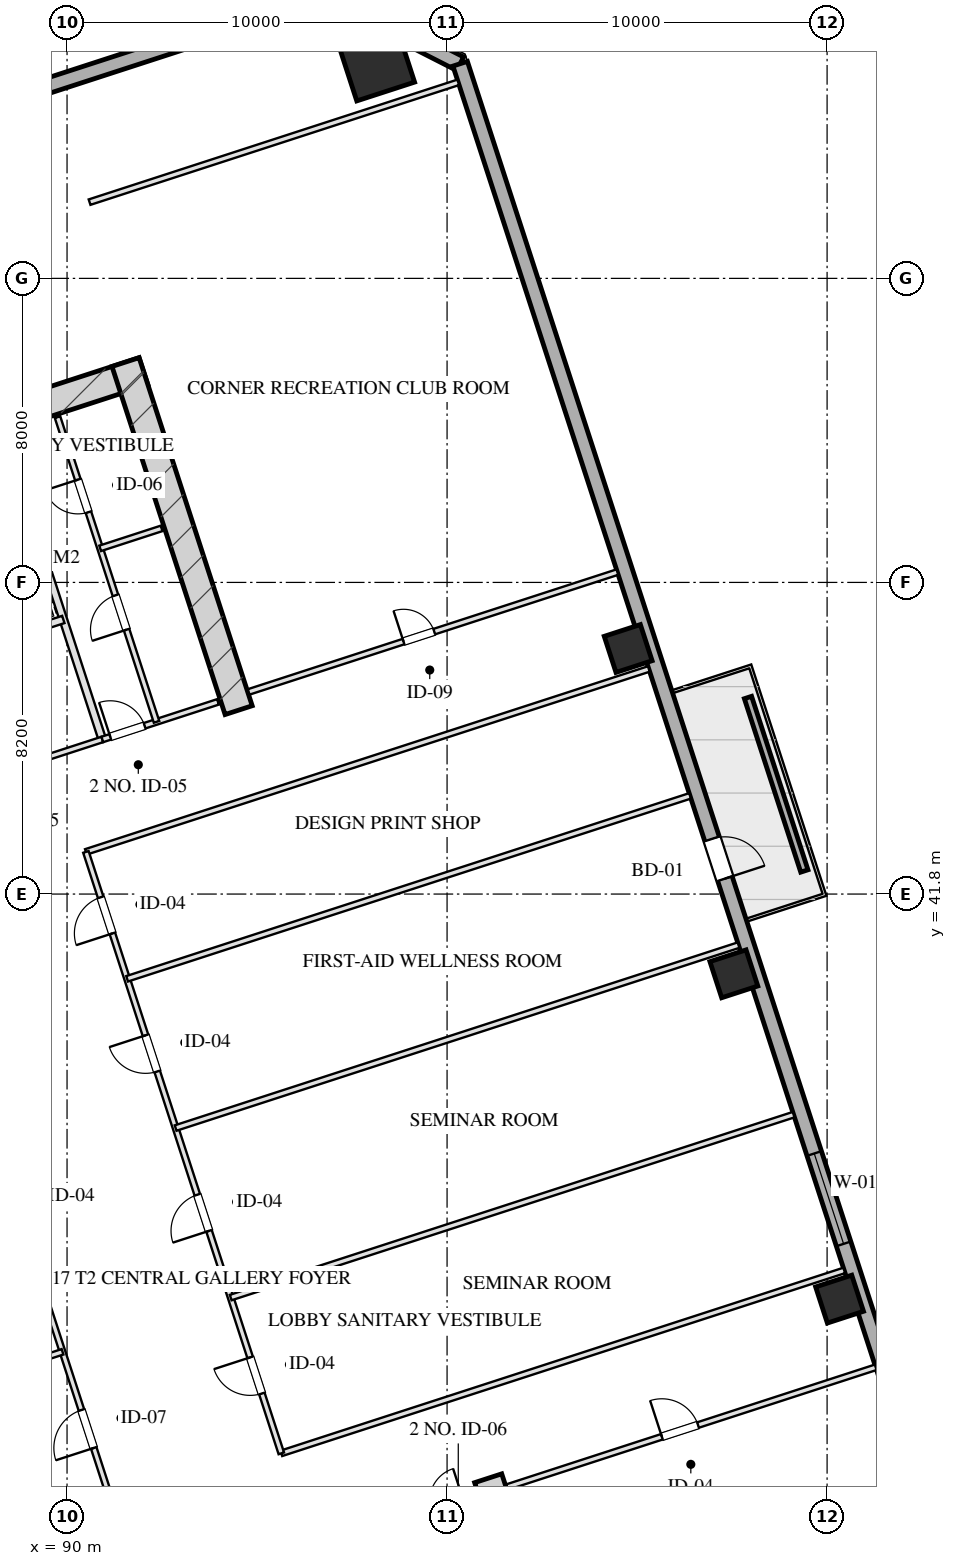
"""IFC4 building model, lengths in metres.
Left out: names, types, materials, properties, quantities, classifications, styles, units other than length and angle.
Written with IfcOpenShell. Run it as: python <this file> out.ifc"""

import sys

from ifc_helpers import new_model, si_unit, direction, frame, frame_2d, origin, origin_2d, place, context, subcontext, project, spatial, rectangle, hollow_rectangle, extrude, element, fill, save


model = new_model("IFC4")
c1 = context("Model", 3, precision=1e-05, world=origin(), true_north=direction((0.0, 1.0)))
c2 = subcontext(c1, "Body", "Model", "MODEL_VIEW")
j1 = project(units=[si_unit("LENGTHUNIT", "METRE"), si_unit("PLANEANGLEUNIT", "RADIAN")], contexts=[c1])
p1 = place(None, origin())
s1 = spatial("IfcSite", under=j1, at=p1, CompositionType="ELEMENT")
p2 = place(p1, origin())
s2 = spatial("IfcBuilding", under=s1, at=p2, CompositionType="ELEMENT")
p3 = place(p2, frame((0.0, 0.0, 71.3)))
s3 = spatial("IfcBuildingStorey", under=s2, at=p3, CompositionType="ELEMENT", Elevation=71.3)
p4 = place(p3, frame((101.082, 26.429, 0.0), z_axis=(0.0, 0.0, 1.0), x_axis=(0.309016134813, -0.951056795583, 0.0)))
e1 = element("IfcWall", 1, at=p4, inside=s3, PredefinedType="SHEAR", context=c2, shape_type="SweptSolid", body=[
    extrude(rectangle(XDim=9.63, YDim=0.75, at=frame_2d((4.815, 0.0))), origin(), (0.0, 0.0, 1.0), 3.45),
])
p5 = place(p3, frame((76.272, 50.443, 0.0), z_axis=(0.0, 0.0, 1.0), x_axis=(0.951056072937, 0.309018358888, 0.0)))
e2 = element("IfcWall", 2, at=p5, inside=s3, PredefinedType="SHEAR", context=c2, shape_type="SweptSolid", body=[
    extrude(rectangle(XDim=16.55, YDim=0.75, at=frame_2d((8.275, 0.0))), origin(), (0.0, 0.0, 1.0), 3.45),
])
p6 = place(p3, frame((94.515, 46.639, 0.0), z_axis=(0.0, 0.0, 1.0), x_axis=(-0.309016134813, 0.951056795583, 0.0)))
e3 = element("IfcWall", 3, at=p6, inside=s3, PredefinedType="SHEAR", context=c2, shape_type="SweptSolid", body=[
    extrude(rectangle(XDim=9.63, YDim=0.75, at=frame_2d((4.815, 0.0))), origin(), (0.0, 0.0, 1.0), 3.45),
])
p7 = place(p3, frame((98.137, 63.677, 0.0), z_axis=(0.0, 0.0, 1.0), x_axis=(0.951056516295, 0.309016994375, 0.0)))
e4 = element("IfcColumn", 4, at=p7, inside=s3, PredefinedType="COLUMN", context=c2, shape_type="SweptSolid", body=[
    extrude(hollow_rectangle(XDim=1.6, YDim=1.6, WallThickness=0.055, at=origin_2d()), origin(), (0.0, 0.0, 1.0), 3.451),
])
for number, where, z_axis, x_axis in (
    (5, (110.328, 31.142, 0.0), (0.0, 0.0, 1.0), (0.951, 0.309, 0.0)),
    (6, (107.547, 39.701, 0.0), (0.0, 0.0, 1.0), (0.951, 0.309, 0.0)),
    (7, (104.766, 48.261, 0.0), (0.0, 0.0, 1.0), (0.951, 0.309, 0.0)),
):
    element("IfcColumn", number, at=place(p3, frame(where, z_axis=z_axis, x_axis=x_axis)), inside=s3, PredefinedType="COLUMN", context=c2, shape_type="SweptSolid", body=[
        extrude(hollow_rectangle(XDim=1.0, YDim=1.0, WallThickness=0.036, at=origin_2d()), origin(), (0.0, 0.0, 1.0), 3.451),
    ])
p8 = place(p3, frame((66.002, 55.433, 0.0), z_axis=(0.0, 0.0, 1.0), x_axis=(0.951055939317, 0.309018770125, 0.0)))
e8 = element("IfcWall", 8, at=p8, inside=s3, PredefinedType="SOLIDWALL", context=c2, shape_type="SweptSolid", body=[
    extrude(rectangle(XDim=32.4, YDim=0.4, at=frame_2d((16.2, 0.0))), origin(), (0.0, 0.0, 1.0), 2.61),
])
p9 = place(p3, frame((96.816, 65.446, 0.0), z_axis=(0.0, 0.0, 1.0), x_axis=(0.890998089617, -0.454007053137, 0.0)))
e9 = element("IfcWall", 9, at=p9, inside=s3, PredefinedType="SOLIDWALL", context=c2, shape_type="SweptSolid", body=[
    extrude(rectangle(XDim=3.96, YDim=0.4, at=frame_2d((1.98, 0.0))), origin(), (0.0, 0.0, 1.0), 2.61),
])
p10 = place(p3, frame((100.345, 63.648, 0.0), z_axis=(0.0, 0.0, 1.0), x_axis=(0.309014526607, -0.951057318118, 0.0)))
e10 = element("IfcWall", 10, at=p10, inside=s3, PredefinedType="SOLIDWALL", context=c2, shape_type="SweptSolid", body=[
    extrude(rectangle(XDim=50.0, YDim=0.4, at=frame_2d((25.0, 0.0))), origin(), (0.0, 0.0, 1.0), 2.61),
])
p11 = place(p10, frame((30.15, 0.0, 0.75)))
e11 = element("IfcOpeningElement", 11, at=p11, cuts=e10, PredefinedType="OPENING", context=c2, shape_type="SweptSolid", body=[
    extrude(rectangle(XDim=2.5, YDim=1.46, at=frame_2d((1.25, 0.73))), frame((0.0, 0.21, 0.0), z_axis=(0.0, -1.0, 0.0), x_axis=(1.0, 0.0, 0.0)), (0.0, 0.0, 1.0), 0.42),
])
p12 = place(p10, frame((21.445, 0.0, 0.0)))
e12 = element("IfcOpeningElement", 12, at=p12, cuts=e10, PredefinedType="OPENING", context=c2, shape_type="SweptSolid", body=[
    extrude(rectangle(XDim=1.1, YDim=2.15, at=frame_2d((0.55, 1.075))), frame((0.0, 0.21, 0.0), z_axis=(0.0, -1.0, 0.0), x_axis=(1.0, 0.0, 0.0)), (0.0, 0.0, 1.0), 0.42),
])
p13 = place(p3, frame((109.402, 42.407, 0.0), z_axis=(0.0, 0.0, 1.0), x_axis=(-0.30900096172, 0.951061725471, 0.0)))
e13 = element("IfcWall", 13, at=p13, inside=s3, PredefinedType="PARAPET", context=c2, shape_type="SweptSolid", body=[
    extrude(rectangle(XDim=4.8, YDim=0.2, at=frame_2d((2.4, 0.0))), origin(), (0.0, 0.0, 1.0), 0.75),
])
p14 = place(p3, frame((90.928, 45.868, 0.0), z_axis=(0.0, 0.0, 1.0), x_axis=(-0.309042196757, 0.951048327176, 0.0)))
e14 = element("IfcWall", 14, at=p14, inside=s3, PredefinedType="PARTITIONING", context=c2, shape_type="SweptSolid", body=[
    extrude(rectangle(XDim=8.43, YDim=0.2, at=frame_2d((4.215, 0.0))), origin(), (0.0, 0.0, 1.0), 3.175),
])
p15 = place(p3, frame((86.743, 44.508, 0.0), z_axis=(0.0, 0.0, 1.0), x_axis=(0.951063829732, 0.308994485023, 0.0)))
e15 = element("IfcWall", 15, at=p15, inside=s3, PredefinedType="PARTITIONING", context=c2, shape_type="SweptSolid", body=[
    extrude(rectangle(XDim=4.4, YDim=0.15, at=frame_2d((2.2, 0.0))), origin(), (0.0, 0.0, 1.0), 3.175),
])
p16 = place(p15, frame((1.45, 0.0, 0.0)))
e16 = element("IfcOpeningElement", 16, at=p16, cuts=e15, PredefinedType="OPENING", context=c2, shape_type="SweptSolid", body=[
    extrude(rectangle(XDim=1.5, YDim=2.05, at=frame_2d((0.75, 1.025))), frame((0.0, 0.085, 0.0), z_axis=(0.0, -1.0, 0.0), x_axis=(1.0, 0.0, 0.0)), (0.0, 0.0, 1.0), 0.17),
])
p17 = place(p3, frame((85.718, 47.666, 0.0), z_axis=(0.0, 0.0, 1.0), x_axis=(0.951058531764, 0.30901079133, 0.0)))
e17 = element("IfcWall", 17, at=p17, inside=s3, PredefinedType="PARTITIONING", context=c2, shape_type="SweptSolid", body=[
    extrude(rectangle(XDim=4.4, YDim=0.2, at=frame_2d((2.2, 0.0))), origin(), (0.0, 0.0, 1.0), 3.175),
])
p18 = place(p17, frame((0.45, 0.0, 0.0)))
e18 = element("IfcOpeningElement", 18, at=p18, cuts=e17, PredefinedType="OPENING", context=c2, shape_type="SweptSolid", body=[
    extrude(rectangle(XDim=1.1, YDim=2.05, at=frame_2d((0.55, 1.025))), frame((0.0, 0.11, 0.0), z_axis=(0.0, -1.0, 0.0), x_axis=(1.0, 0.0, 0.0)), (0.0, 0.0, 1.0), 0.22),
])
p19 = place(p17, frame((2.55, 0.0, 0.0)))
e19 = element("IfcOpeningElement", 19, at=p19, cuts=e17, PredefinedType="OPENING", context=c2, shape_type="SweptSolid", body=[
    extrude(rectangle(XDim=1.1, YDim=2.05, at=frame_2d((0.55, 1.025))), frame((0.0, 0.11, 0.0), z_axis=(0.0, -1.0, 0.0), x_axis=(1.0, 0.0, 0.0)), (0.0, 0.0, 1.0), 0.22),
])
p20 = place(p3, frame((90.928, 45.868, 0.0), z_axis=(0.0, 0.0, 1.0), x_axis=(0.951059297078, 0.309008435874, 0.0)))
e20 = element("IfcWall", 20, at=p20, inside=s3, PredefinedType="PARTITIONING", context=c2, shape_type="SweptSolid", body=[
    extrude(rectangle(XDim=3.2, YDim=0.15, at=frame_2d((1.6, 0.0))), origin(), (0.0, 0.0, 1.0), 3.175),
])
p21 = place(p20, frame((0.22, 0.0, 0.0)))
e21 = element("IfcOpeningElement", 21, at=p21, cuts=e20, PredefinedType="OPENING", context=c2, shape_type="SweptSolid", body=[
    extrude(rectangle(XDim=0.95, YDim=2.05, at=frame_2d((0.475, 1.025))), frame((0.0, 0.085, 0.0), z_axis=(0.0, -1.0, 0.0), x_axis=(1.0, 0.0, 0.0)), (0.0, 0.0, 1.0), 0.17),
])
p22 = place(p3, frame((92.355, 46.331, 0.0), z_axis=(0.0, 0.0, 1.0), x_axis=(-0.309007490203, 0.951059604335, 0.0)))
e22 = element("IfcWall", 22, at=p22, inside=s3, PredefinedType="PARTITIONING", context=c2, shape_type="SweptSolid", body=[
    extrude(rectangle(XDim=8.43, YDim=0.15, at=frame_2d((4.215, 0.0))), origin(), (0.0, 0.0, 1.0), 3.175),
])
p23 = place(p22, frame((2.55, 0.0, 0.0)))
e23 = element("IfcOpeningElement", 23, at=p23, cuts=e22, PredefinedType="OPENING", context=c2, shape_type="SweptSolid", body=[
    extrude(rectangle(XDim=0.95, YDim=2.05, at=frame_2d((0.475, 1.025))), frame((0.0, 0.085, 0.0), z_axis=(0.0, -1.0, 0.0), x_axis=(1.0, 0.0, 0.0)), (0.0, 0.0, 1.0), 0.17),
])
p24 = place(p22, frame((5.8, 0.0, 0.0)))
e24 = element("IfcOpeningElement", 24, at=p24, cuts=e22, PredefinedType="OPENING", context=c2, shape_type="SweptSolid", body=[
    extrude(rectangle(XDim=0.9, YDim=2.05, at=frame_2d((0.45, 1.025))), frame((0.0, 0.085, 0.0), z_axis=(0.0, -1.0, 0.0), x_axis=(1.0, 0.0, 0.0)), (0.0, 0.0, 1.0), 0.17),
])
p25 = place(p3, frame((90.871, 50.896, 0.0), z_axis=(0.0, 0.0, 1.0), x_axis=(0.951054116971, 0.309024378638, 0.0)))
e25 = element("IfcWall", 25, at=p25, inside=s3, PredefinedType="PARTITIONING", context=c2, shape_type="SweptSolid", body=[
    extrude(rectangle(XDim=1.7, YDim=0.15, at=frame_2d((0.85, 0.0))), origin(), (0.0, 0.0, 1.0), 3.175),
])
p26 = place(p3, frame((101.578, 26.196, 0.0), z_axis=(0.0, 0.0, 1.0), x_axis=(0.951059043131, 0.309009217467, 0.0)))
e26 = element("IfcWall", 26, at=p26, inside=s3, PredefinedType="PARTITIONING", context=c2, shape_type="SweptSolid", body=[
    extrude(rectangle(XDim=10.2, YDim=0.15, at=frame_2d((5.1, 0.0))), origin(), (0.0, 0.0, 1.0), 3.175),
])
p27 = place(p26, frame((4.284, 0.0, 0.0)))
e27 = element("IfcOpeningElement", 27, at=p27, cuts=e26, PredefinedType="OPENING", context=c2, shape_type="SweptSolid", body=[
    extrude(rectangle(XDim=1.0, YDim=2.05, at=frame_2d((0.5, 1.025))), frame((0.0, 0.085, 0.0), z_axis=(0.0, -1.0, 0.0), x_axis=(1.0, 0.0, 0.0)), (0.0, 0.0, 1.0), 0.17),
])
p28 = place(p3, frame((90.593, 60.006, 0.0), z_axis=(0.0, 0.0, 1.0), x_axis=(0.951059043131, 0.309009217467, 0.0)))
e28 = element("IfcWall", 28, at=p28, inside=s3, PredefinedType="PARTITIONING", context=c2, shape_type="SweptSolid", body=[
    extrude(rectangle(XDim=10.2, YDim=0.15, at=frame_2d((5.1, 0.0))), origin(), (0.0, 0.0, 1.0), 3.175),
])
p29 = place(p3, frame((94.78, 47.119, 0.0), z_axis=(0.0, 0.0, 1.0), x_axis=(0.951054294345, 0.309023832749, 0.0)))
e29 = element("IfcWall", 29, at=p29, inside=s3, PredefinedType="PARTITIONING", context=c2, shape_type="SweptSolid", body=[
    extrude(rectangle(XDim=10.2, YDim=0.15, at=frame_2d((5.1, 0.0))), origin(), (0.0, 0.0, 1.0), 3.175),
])
p30 = place(p29, frame((4.284, 0.0, 0.0)))
e30 = element("IfcOpeningElement", 30, at=p30, cuts=e29, PredefinedType="OPENING", context=c2, shape_type="SweptSolid", body=[
    extrude(rectangle(XDim=0.85, YDim=2.05, at=frame_2d((0.425, 1.025))), frame((0.0, 0.085, 0.0), z_axis=(0.0, -1.0, 0.0), x_axis=(1.0, 0.0, 0.0)), (0.0, 0.0, 1.0), 0.17),
])
for number, where, z_axis, x_axis in (
    (31, (95.638, 27.084, 0.0), (0.0, 0.0, 1.0), (0.951, 0.309, 0.0)),
    (32, (90.496, 42.909, 0.0), (0.0, 0.0, 1.0), (0.951, 0.309, 0.0)),
):
    element("IfcWall", number, at=place(p3, frame(where, z_axis=z_axis, x_axis=x_axis)), inside=s3, PredefinedType="PARTITIONING", context=c2, shape_type="SweptSolid", body=[
        extrude(rectangle(XDim=15.575, YDim=0.15, at=frame_2d((7.788, 0.0))), origin(), (0.0, 0.0, 1.0), 3.175),
    ])
p31 = place(p3, frame((91.216, 25.647, 0.0), z_axis=(0.0, 0.0, 1.0), x_axis=(-0.309022042254, 0.951054876125, 0.0)))
e33 = element("IfcWall", 33, at=p31, inside=s3, PredefinedType="PARTITIONING", context=c2, shape_type="SweptSolid", body=[
    extrude(rectangle(XDim=16.64, YDim=0.15, at=frame_2d((8.32, 0.0))), origin(), (0.0, 0.0, 1.0), 3.175),
])
p32 = place(p31, frame((1.66, 0.0, 0.0)))
e34 = element("IfcOpeningElement", 34, at=p32, cuts=e33, PredefinedType="OPENING", context=c2, shape_type="SweptSolid", body=[
    extrude(rectangle(XDim=1.05, YDim=2.05, at=frame_2d((0.525, 1.025))), frame((0.0, 0.085, 0.0), z_axis=(0.0, -1.0, 0.0), x_axis=(1.0, 0.0, 0.0)), (0.0, 0.0, 1.0), 0.17),
])
p33 = place(p31, frame((7.82, 0.0, 0.0)))
e35 = element("IfcOpeningElement", 35, at=p33, cuts=e33, PredefinedType="OPENING", context=c2, shape_type="SweptSolid", body=[
    extrude(rectangle(XDim=1.0, YDim=2.05, at=frame_2d((0.5, 1.025))), frame((0.0, 0.085, 0.0), z_axis=(0.0, -1.0, 0.0), x_axis=(1.0, 0.0, 0.0)), (0.0, 0.0, 1.0), 0.17),
])
p34 = place(p31, frame((13.98, 0.0, 0.0)))
e36 = element("IfcOpeningElement", 36, at=p34, cuts=e33, PredefinedType="OPENING", context=c2, shape_type="SweptSolid", body=[
    extrude(rectangle(XDim=1.0, YDim=2.05, at=frame_2d((0.5, 1.025))), frame((0.0, 0.085, 0.0), z_axis=(0.0, -1.0, 0.0), x_axis=(1.0, 0.0, 0.0)), (0.0, 0.0, 1.0), 0.17),
])
p35 = place(p3, frame((95.638, 27.084, 0.0), z_axis=(0.0, 0.0, 1.0), x_axis=(-0.30901773025, 0.951056277195, 0.0)))
e37 = element("IfcWall", 37, at=p35, inside=s3, PredefinedType="PARTITIONING", context=c2, shape_type="SweptSolid", body=[
    extrude(rectangle(XDim=16.64, YDim=0.15, at=frame_2d((8.32, 0.0))), origin(), (0.0, 0.0, 1.0), 3.175),
])
p36 = place(p35, frame((1.655, 0.0, 0.0)))
e38 = element("IfcOpeningElement", 38, at=p36, cuts=e37, PredefinedType="OPENING", context=c2, shape_type="SweptSolid", body=[
    extrude(rectangle(XDim=1.0, YDim=2.05, at=frame_2d((0.5, 1.025))), frame((0.0, 0.085, 0.0), z_axis=(0.0, -1.0, 0.0), x_axis=(1.0, 0.0, 0.0)), (0.0, 0.0, 1.0), 0.17),
])
p37 = place(p35, frame((6.155, 0.0, 0.0)))
e39 = element("IfcOpeningElement", 39, at=p37, cuts=e37, PredefinedType="OPENING", context=c2, shape_type="SweptSolid", body=[
    extrude(rectangle(XDim=1.0, YDim=2.05, at=frame_2d((0.5, 1.025))), frame((0.0, 0.085, 0.0), z_axis=(0.0, -1.0, 0.0), x_axis=(1.0, 0.0, 0.0)), (0.0, 0.0, 1.0), 0.17),
])
p38 = place(p35, frame((10.565, 0.0, 0.0)))
e40 = element("IfcOpeningElement", 40, at=p38, cuts=e37, PredefinedType="OPENING", context=c2, shape_type="SweptSolid", body=[
    extrude(rectangle(XDim=1.0, YDim=2.05, at=frame_2d((0.5, 1.025))), frame((0.0, 0.085, 0.0), z_axis=(0.0, -1.0, 0.0), x_axis=(1.0, 0.0, 0.0)), (0.0, 0.0, 1.0), 0.17),
])
p39 = place(p35, frame((14.385, 0.0, 0.0)))
e41 = element("IfcOpeningElement", 41, at=p39, cuts=e37, PredefinedType="OPENING", context=c2, shape_type="SweptSolid", body=[
    extrude(rectangle(XDim=1.0, YDim=2.05, at=frame_2d((0.5, 1.025))), frame((0.0, 0.085, 0.0), z_axis=(0.0, -1.0, 0.0), x_axis=(1.0, 0.0, 0.0)), (0.0, 0.0, 1.0), 0.17),
])
p40 = place(p3, frame((73.356, 24.386, 0.0), z_axis=(0.0, 0.0, 1.0), x_axis=(0.951057299418, 0.309014584159, 0.0)))
e42 = element("IfcWall", 42, at=p40, inside=s3, PredefinedType="PARTITIONING", context=c2, shape_type="SweptSolid", body=[
    extrude(rectangle(XDim=17.375, YDim=0.15, at=frame_2d((8.688, 0.0))), origin(), (0.0, 0.0, 1.0), 3.175),
])
for number, where, z_axis, x_axis in (
    (43, (94.306, 31.183, 0.0), (0.0, 0.0, 1.0), (0.951, 0.309, 0.0)),
    (44, (92.857, 35.643, 0.0), (0.0, 0.0, 1.0), (0.951, 0.309, 0.0)),
    (45, (91.581, 39.57, 0.0), (0.0, 0.0, 1.0), (0.951, 0.309, 0.0)),
):
    element("IfcWall", number, at=place(p3, frame(where, z_axis=z_axis, x_axis=x_axis)), inside=s3, PredefinedType="PARTITIONING", context=c2, shape_type="SweptSolid", body=[
        extrude(rectangle(XDim=15.575, YDim=0.15, at=frame_2d((7.788, 0.0))), origin(), (0.0, 0.0, 1.0), 3.175),
    ])
p41 = place(p11, origin())
e46 = element("IfcWindow", 46, at=p41, inside=s3, PartitioningType="TRIPLE_PANEL_VERTICAL", PredefinedType="WINDOW", context=c2, shape_type="SweptSolid", body=[
    extrude(rectangle(XDim=2.5, YDim=1.46, at=frame_2d((1.25, 0.73))), frame((0.0, 0.03, 0.0), z_axis=(0.0, -1.0, 0.0), x_axis=(1.0, 0.0, 0.0)), (0.0, 0.0, 1.0), 0.06),
])
fill(e11, e46)
p42 = place(p12, origin())
e47 = element("IfcDoor", 47, at=p42, inside=s3, OperationType="SINGLE_SWING_RIGHT", PredefinedType="DOOR", context=c2, shape_type="SweptSolid", body=[
    extrude(rectangle(XDim=1.1, YDim=2.15, at=frame_2d((0.55, 1.075))), frame((0.0, 0.025, 0.0), z_axis=(0.0, -1.0, 0.0), x_axis=(1.0, 0.0, 0.0)), (0.0, 0.0, 1.0), 0.05),
])
fill(e12, e47)
p43 = place(p21, origin())
e48 = element("IfcDoor", 48, at=p43, inside=s3, OperationType="SINGLE_SWING_LEFT", PredefinedType="DOOR", context=c2, shape_type="SweptSolid", body=[
    extrude(rectangle(XDim=0.95, YDim=2.05, at=frame_2d((0.475, 1.025))), frame((0.0, 0.025, 0.0), z_axis=(0.0, -1.0, 0.0), x_axis=(1.0, 0.0, 0.0)), (0.0, 0.0, 1.0), 0.05),
])
fill(e21, e48)
p44 = place(p23, origin())
e49 = element("IfcDoor", 49, at=p44, inside=s3, OperationType="SINGLE_SWING_LEFT", PredefinedType="DOOR", context=c2, shape_type="SweptSolid", body=[
    extrude(rectangle(XDim=0.95, YDim=2.05, at=frame_2d((0.475, 1.025))), frame((0.0, 0.025, 0.0), z_axis=(0.0, -1.0, 0.0), x_axis=(1.0, 0.0, 0.0)), (0.0, 0.0, 1.0), 0.05),
])
fill(e23, e49)
p45 = place(p24, origin())
e50 = element("IfcDoor", 50, at=p45, inside=s3, OperationType="SINGLE_SWING_RIGHT", PredefinedType="DOOR", context=c2, shape_type="SweptSolid", body=[
    extrude(rectangle(XDim=0.9, YDim=2.05, at=frame_2d((0.45, 1.025))), frame((0.0, 0.025, 0.0), z_axis=(0.0, -1.0, 0.0), x_axis=(1.0, 0.0, 0.0)), (0.0, 0.0, 1.0), 0.05),
])
fill(e24, e50)
p46 = place(p27, origin())
e51 = element("IfcDoor", 51, at=p46, inside=s3, OperationType="SINGLE_SWING_LEFT", PredefinedType="DOOR", context=c2, shape_type="SweptSolid", body=[
    extrude(rectangle(XDim=1.0, YDim=2.05, at=frame_2d((0.5, 1.025))), frame((0.0, 0.025, 0.0), z_axis=(0.0, -1.0, 0.0), x_axis=(1.0, 0.0, 0.0)), (0.0, 0.0, 1.0), 0.05),
])
fill(e27, e51)
p47 = place(p30, origin())
e52 = element("IfcDoor", 52, at=p47, inside=s3, OperationType="SINGLE_SWING_LEFT", PredefinedType="DOOR", context=c2, shape_type="SweptSolid", body=[
    extrude(rectangle(XDim=0.85, YDim=2.05, at=frame_2d((0.425, 1.025))), frame((0.0, 0.025, 0.0), z_axis=(0.0, -1.0, 0.0), x_axis=(1.0, 0.0, 0.0)), (0.0, 0.0, 1.0), 0.05),
])
fill(e30, e52)
p48 = place(p32, origin())
e53 = element("IfcDoor", 53, at=p48, inside=s3, OperationType="SINGLE_SWING_LEFT", PredefinedType="DOOR", context=c2, shape_type="SweptSolid", body=[
    extrude(rectangle(XDim=1.05, YDim=2.05, at=frame_2d((0.525, 1.025))), frame((0.0, 0.025, 0.0), z_axis=(0.0, -1.0, 0.0), x_axis=(1.0, 0.0, 0.0)), (0.0, 0.0, 1.0), 0.05),
])
fill(e34, e53)
p49 = place(p36, origin())
e54 = element("IfcDoor", 54, at=p49, inside=s3, OperationType="SINGLE_SWING_RIGHT", PredefinedType="DOOR", context=c2, shape_type="SweptSolid", body=[
    extrude(rectangle(XDim=1.0, YDim=2.05, at=frame_2d((0.5, 1.025))), frame((0.0, 0.025, 0.0), z_axis=(0.0, -1.0, 0.0), x_axis=(1.0, 0.0, 0.0)), (0.0, 0.0, 1.0), 0.05),
])
fill(e38, e54)
p50 = place(p37, origin())
e55 = element("IfcDoor", 55, at=p50, inside=s3, OperationType="SINGLE_SWING_LEFT", PredefinedType="DOOR", context=c2, shape_type="SweptSolid", body=[
    extrude(rectangle(XDim=1.0, YDim=2.05, at=frame_2d((0.5, 1.025))), frame((0.0, 0.025, 0.0), z_axis=(0.0, -1.0, 0.0), x_axis=(1.0, 0.0, 0.0)), (0.0, 0.0, 1.0), 0.05),
])
fill(e39, e55)
p51 = place(p38, origin())
e56 = element("IfcDoor", 56, at=p51, inside=s3, OperationType="SINGLE_SWING_RIGHT", PredefinedType="DOOR", context=c2, shape_type="SweptSolid", body=[
    extrude(rectangle(XDim=1.0, YDim=2.05, at=frame_2d((0.5, 1.025))), frame((0.0, 0.025, 0.0), z_axis=(0.0, -1.0, 0.0), x_axis=(1.0, 0.0, 0.0)), (0.0, 0.0, 1.0), 0.05),
])
fill(e40, e56)
p52 = place(p39, origin())
e57 = element("IfcDoor", 57, at=p52, inside=s3, OperationType="SINGLE_SWING_LEFT", PredefinedType="DOOR", context=c2, shape_type="SweptSolid", body=[
    extrude(rectangle(XDim=1.0, YDim=2.05, at=frame_2d((0.5, 1.025))), frame((0.0, 0.025, 0.0), z_axis=(0.0, -1.0, 0.0), x_axis=(1.0, 0.0, 0.0)), (0.0, 0.0, 1.0), 0.05),
])
fill(e41, e57)
save(model, sys.argv[1])
